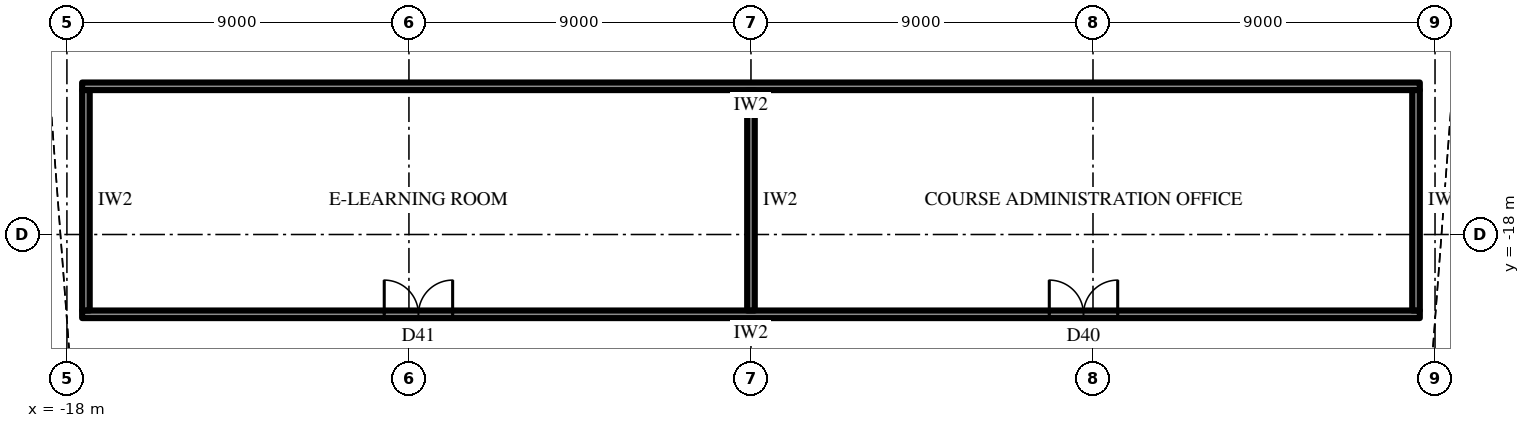
"""IFC4 building model, lengths in metres.
Left out: names, types, materials, properties, quantities, classifications, styles, units other than length and angle.
Written with IfcOpenShell. Run it as: python <this file> out.ifc"""

import sys

from ifc_helpers import new_model, si_unit, direction, frame, frame_2d, origin, place, context, subcontext, project, spatial, rectangle, extrude, element, fill, save


model = new_model("IFC4")
c1 = context("Model", 3, precision=1e-05, world=origin(), true_north=direction((0.0, 1.0)))
c2 = subcontext(c1, "Body", "Model", "MODEL_VIEW")
j1 = project(units=[si_unit("LENGTHUNIT", "METRE"), si_unit("PLANEANGLEUNIT", "RADIAN")], contexts=[c1])
p1 = place(None, origin())
s1 = spatial("IfcSite", under=j1, at=p1, CompositionType="ELEMENT")
p2 = place(p1, origin())
s2 = spatial("IfcBuilding", under=s1, at=p2, CompositionType="ELEMENT")
p3 = place(p2, frame((0.0, 0.0, 119.5)))
s3 = spatial("IfcBuildingStorey", under=s2, at=p3, CompositionType="ELEMENT", Elevation=119.5)
p4 = place(p3, frame((17.6, -14.1, 0.0), z_axis=(0.0, 0.0, 1.0), x_axis=(-1.0, 0.0, 0.0)))
e1 = element("IfcWall", 1, at=p4, inside=s3, PredefinedType="PARTITIONING", context=c2, shape_type="SweptSolid", body=[
    extrude(rectangle(XDim=35.2, YDim=0.2, at=frame_2d((17.6, 0.0))), origin(), (0.0, 0.0, 1.0), 4.0),
])
p5 = place(p3, frame((17.6, -20.1, 0.0), z_axis=(0.0, 0.0, 1.0), x_axis=(-1.0, 0.0, 0.0)))
e2 = element("IfcWall", 2, at=p5, inside=s3, PredefinedType="PARTITIONING", context=c2, shape_type="SweptSolid", body=[
    extrude(rectangle(XDim=35.2, YDim=0.2, at=frame_2d((17.6, 0.0))), origin(), (0.0, 0.0, 1.0), 4.0),
])
p6 = place(p5, frame((7.95, 0.0, 0.0)))
e3 = element("IfcOpeningElement", 3, at=p6, cuts=e2, PredefinedType="OPENING", context=c2, shape_type="SweptSolid", body=[
    extrude(rectangle(XDim=1.8, YDim=2.4, at=frame_2d((0.9, 1.2))), frame((0.0, 0.11, 0.0), z_axis=(0.0, -1.0, 0.0), x_axis=(1.0, 0.0, 0.0)), (0.0, 0.0, 1.0), 0.22),
])
p7 = place(p5, frame((25.45, 0.0, 0.0)))
e4 = element("IfcOpeningElement", 4, at=p7, cuts=e2, PredefinedType="OPENING", context=c2, shape_type="SweptSolid", body=[
    extrude(rectangle(XDim=1.8, YDim=2.4, at=frame_2d((0.9, 1.2))), frame((0.0, 0.11, 0.0), z_axis=(0.0, -1.0, 0.0), x_axis=(1.0, 0.0, 0.0)), (0.0, 0.0, 1.0), 0.22),
])
p8 = place(p3, frame((17.5, -14.2, 0.0), z_axis=(0.0, 0.0, 1.0), x_axis=(0.0, -1.0, 0.0)))
e5 = element("IfcWall", 5, at=p8, inside=s3, PredefinedType="PARTITIONING", context=c2, shape_type="SweptSolid", body=[
    extrude(rectangle(XDim=5.8, YDim=0.2, at=frame_2d((2.9, 0.0))), origin(), (0.0, 0.0, 1.0), 4.0),
])
p9 = place(p3, frame((0.0, -14.2, 0.0), z_axis=(0.0, 0.0, 1.0), x_axis=(0.0, -1.0, 0.0)))
e6 = element("IfcWall", 6, at=p9, inside=s3, PredefinedType="PARTITIONING", context=c2, shape_type="SweptSolid", body=[
    extrude(rectangle(XDim=5.8, YDim=0.2, at=frame_2d((2.9, 0.0))), origin(), (0.0, 0.0, 1.0), 2.992),
])
p10 = place(p3, frame((-17.5, -14.2, 0.0), z_axis=(0.0, 0.0, 1.0), x_axis=(0.0, -1.0, 0.0)))
e7 = element("IfcWall", 7, at=p10, inside=s3, PredefinedType="PARTITIONING", context=c2, shape_type="SweptSolid", body=[
    extrude(rectangle(XDim=5.8, YDim=0.2, at=frame_2d((2.9, 0.0))), origin(), (0.0, 0.0, 1.0), 4.0),
])
p11 = place(p6, frame((1.8, 0.0, 0.0), z_axis=(0.0, 0.0, 1.0), x_axis=(-1.0, 0.0, 0.0)))
e8 = element("IfcDoor", 8, at=p11, inside=s3, OperationType="DOUBLE_DOOR_SINGLE_SWING", PredefinedType="DOOR", context=c2, shape_type="SweptSolid", body=[
    extrude(rectangle(XDim=1.8, YDim=2.4, at=frame_2d((0.9, 1.2))), frame((0.0, 0.025, 0.0), z_axis=(0.0, -1.0, 0.0), x_axis=(1.0, 0.0, 0.0)), (0.0, 0.0, 1.0), 0.05),
])
fill(e3, e8)
p12 = place(p7, frame((1.8, 0.0, 0.0), z_axis=(0.0, 0.0, 1.0), x_axis=(-1.0, 0.0, 0.0)))
e9 = element("IfcDoor", 9, at=p12, inside=s3, OperationType="DOUBLE_DOOR_SINGLE_SWING", PredefinedType="DOOR", context=c2, shape_type="SweptSolid", body=[
    extrude(rectangle(XDim=1.8, YDim=2.4, at=frame_2d((0.9, 1.2))), frame((0.0, 0.025, 0.0), z_axis=(0.0, -1.0, 0.0), x_axis=(1.0, 0.0, 0.0)), (0.0, 0.0, 1.0), 0.05),
])
fill(e4, e9)
save(model, sys.argv[1])
